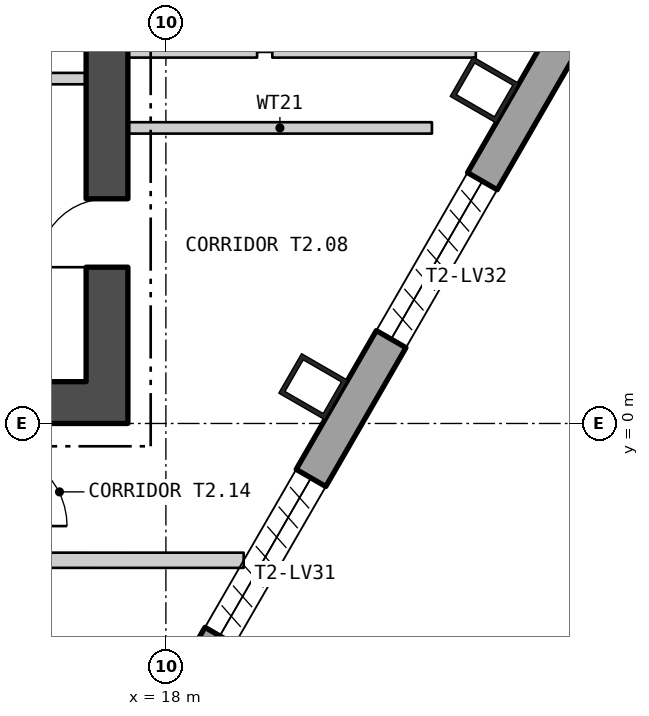
"""IFC4 building model, lengths in metres.
Left out: names, types, materials, properties, quantities, classifications, styles, units other than length and angle.
Written with IfcOpenShell. Run it as: python <this file> out.ifc"""

import sys

from ifc_helpers import new_model, si_unit, direction, frame, frame_2d, origin, origin_2d, place, context, subcontext, project, spatial, polyline, rectangle, hollow_rectangle, outline, extrude, element, fill, save


model = new_model("IFC4")
c1 = context("Model", 3, precision=1e-05, world=origin(), true_north=direction((0.0, 1.0)))
c2 = subcontext(c1, "Body", "Model", "MODEL_VIEW")
j1 = project(units=[si_unit("LENGTHUNIT", "METRE"), si_unit("PLANEANGLEUNIT", "RADIAN")], contexts=[c1])
p1 = place(None, origin())
s1 = spatial("IfcSite", under=j1, at=p1, CompositionType="ELEMENT")
p2 = place(p1, origin())
s2 = spatial("IfcBuilding", under=s1, at=p2, CompositionType="ELEMENT")
p3 = place(p2, frame((0.0, 0.0, 133.8)))
s3 = spatial("IfcBuildingStorey", under=s2, at=p3, CompositionType="ELEMENT", Elevation=133.8)
for number, where, z_axis, x_axis in (
    (1, (19.938, 0.484, 0.0), (0.0, 0.0, 1.0), (0.5, 0.866, 0.0)),
    (2, (22.193, 4.389, 0.0), (0.0, 0.0, 1.0), (0.5, 0.866, 0.0)),
):
    element("IfcColumn", number, at=place(p3, frame(where, z_axis=z_axis, x_axis=x_axis)), inside=s3, PredefinedType="COLUMN", context=c2, shape_type="SweptSolid", body=[
        extrude(hollow_rectangle(XDim=0.6, YDim=0.7, WallThickness=0.06, at=origin_2d()), origin(), (0.0, 0.0, 1.0), 6.0),
    ])
p4 = place(p3, frame((4.49, -27.423, -0.18), z_axis=(0.0, 0.0, 1.0), x_axis=(0.500000335318, 0.866025210188, 0.0)))
e3 = element("IfcWall", 3, at=p4, inside=s3, PredefinedType="SOLIDWALL", context=c2, shape_type="SweptSolid", body=[
    extrude(outline(polyline([(-0.13, -0.225), (45.88, -0.225), (45.62, 0.225), (0.13, 0.225), (-0.13, -0.225)])), origin(), (0.0, 0.0, 1.0), 6.0),
])
p5 = place(p4, frame((1.425, 0.0, 1.38)))
e4 = element("IfcOpeningElement", 4, at=p5, cuts=e3, PredefinedType="OPENING", context=c2, shape_type="SweptSolid", body=[
    extrude(rectangle(XDim=2.4, YDim=3.6, at=frame_2d((1.2, 1.8))), frame((0.0, 0.235, 0.0), z_axis=(0.0, -1.0, 0.0), x_axis=(1.0, 0.0, 0.0)), (0.0, 0.0, 1.0), 0.47),
])
p6 = place(p4, frame((5.895, 0.0, 1.38)))
e5 = element("IfcOpeningElement", 5, at=p6, cuts=e3, PredefinedType="OPENING", context=c2, shape_type="SweptSolid", body=[
    extrude(rectangle(XDim=2.4, YDim=3.6, at=frame_2d((1.2, 1.8))), frame((0.0, 0.235, 0.0), z_axis=(0.0, -1.0, 0.0), x_axis=(1.0, 0.0, 0.0)), (0.0, 0.0, 1.0), 0.47),
])
p7 = place(p4, frame((10.403, 0.0, 1.38)))
e6 = element("IfcOpeningElement", 6, at=p7, cuts=e3, PredefinedType="OPENING", context=c2, shape_type="SweptSolid", body=[
    extrude(rectangle(XDim=2.4, YDim=3.6, at=frame_2d((1.2, 1.8))), frame((0.0, 0.235, 0.0), z_axis=(0.0, -1.0, 0.0), x_axis=(1.0, 0.0, 0.0)), (0.0, 0.0, 1.0), 0.47),
])
p8 = place(p4, frame((14.912, 0.0, 1.38)))
e7 = element("IfcOpeningElement", 7, at=p8, cuts=e3, PredefinedType="OPENING", context=c2, shape_type="SweptSolid", body=[
    extrude(rectangle(XDim=2.4, YDim=3.6, at=frame_2d((1.2, 1.8))), frame((0.0, 0.235, 0.0), z_axis=(0.0, -1.0, 0.0), x_axis=(1.0, 0.0, 0.0)), (0.0, 0.0, 1.0), 0.47),
])
p9 = place(p4, frame((19.421, 0.0, 1.38)))
e8 = element("IfcOpeningElement", 8, at=p9, cuts=e3, PredefinedType="OPENING", context=c2, shape_type="SweptSolid", body=[
    extrude(rectangle(XDim=2.4, YDim=3.6, at=frame_2d((1.2, 1.8))), frame((0.0, 0.235, 0.0), z_axis=(0.0, -1.0, 0.0), x_axis=(1.0, 0.0, 0.0)), (0.0, 0.0, 1.0), 0.47),
])
p10 = place(p4, frame((23.929, 0.0, 1.38)))
e9 = element("IfcOpeningElement", 9, at=p10, cuts=e3, PredefinedType="OPENING", context=c2, shape_type="SweptSolid", body=[
    extrude(rectangle(XDim=2.4, YDim=3.6, at=frame_2d((1.2, 1.8))), frame((0.0, 0.235, 0.0), z_axis=(0.0, -1.0, 0.0), x_axis=(1.0, 0.0, 0.0)), (0.0, 0.0, 1.0), 0.47),
])
p11 = place(p4, frame((28.438, 0.0, 1.38)))
e10 = element("IfcOpeningElement", 10, at=p11, cuts=e3, PredefinedType="OPENING", context=c2, shape_type="SweptSolid", body=[
    extrude(rectangle(XDim=2.4, YDim=3.6, at=frame_2d((1.2, 1.8))), frame((0.0, 0.235, 0.0), z_axis=(0.0, -1.0, 0.0), x_axis=(1.0, 0.0, 0.0)), (0.0, 0.0, 1.0), 0.47),
])
p12 = place(p4, frame((32.947, 0.0, 1.38)))
e11 = element("IfcOpeningElement", 11, at=p12, cuts=e3, PredefinedType="OPENING", context=c2, shape_type="SweptSolid", body=[
    extrude(rectangle(XDim=2.4, YDim=3.6, at=frame_2d((1.2, 1.8))), frame((0.0, 0.235, 0.0), z_axis=(0.0, -1.0, 0.0), x_axis=(1.0, 0.0, 0.0)), (0.0, 0.0, 1.0), 0.47),
])
p13 = place(p4, frame((37.455, 0.0, 1.38)))
e12 = element("IfcOpeningElement", 12, at=p13, cuts=e3, PredefinedType="OPENING", context=c2, shape_type="SweptSolid", body=[
    extrude(rectangle(XDim=2.4, YDim=3.6, at=frame_2d((1.2, 1.8))), frame((0.0, 0.235, 0.0), z_axis=(0.0, -1.0, 0.0), x_axis=(1.0, 0.0, 0.0)), (0.0, 0.0, 1.0), 0.47),
])
p14 = place(p4, frame((41.925, 0.0, 1.38)))
e13 = element("IfcOpeningElement", 13, at=p14, cuts=e3, PredefinedType="OPENING", context=c2, shape_type="SweptSolid", body=[
    extrude(rectangle(XDim=2.4, YDim=3.6, at=frame_2d((1.2, 1.8))), frame((0.0, 0.235, 0.0), z_axis=(0.0, -1.0, 0.0), x_axis=(1.0, 0.0, 0.0)), (0.0, 0.0, 1.0), 0.47),
])
p15 = place(p3, frame((-17.5, 0.275, 0.0), z_axis=(0.0, 0.0, 1.0), x_axis=(1.0, 0.0, 0.0)))
e14 = element("IfcWall", 14, at=p15, inside=s3, PredefinedType="SHEAR", context=c2, shape_type="SweptSolid", body=[
    extrude(rectangle(XDim=35.0, YDim=0.55, at=frame_2d((17.5, 0.0))), origin(), (0.0, 0.0, 1.0), 5.8),
])
p16 = place(p15, frame((12.0, 0.0, 0.0)))
e15 = element("IfcOpeningElement", 15, at=p16, cuts=e14, PredefinedType="OPENING", context=c2, shape_type="SweptSolid", body=[
    extrude(rectangle(XDim=1.8, YDim=2.4, at=frame_2d((0.9, 1.2))), frame((0.0, 0.285, 0.0), z_axis=(0.0, -1.0, 0.0), x_axis=(1.0, 0.0, 0.0)), (0.0, 0.0, 1.0), 0.57),
])
p17 = place(p15, frame((22.0, 0.0, 0.0)))
e16 = element("IfcOpeningElement", 16, at=p17, cuts=e14, PredefinedType="OPENING", context=c2, shape_type="SweptSolid", body=[
    extrude(rectangle(XDim=1.8, YDim=2.4, at=frame_2d((0.9, 1.2))), frame((0.0, 0.285, 0.0), z_axis=(0.0, -1.0, 0.0), x_axis=(1.0, 0.0, 0.0)), (0.0, 0.0, 1.0), 0.57),
])
p18 = place(p3, frame((17.225, 0.55, 0.0), z_axis=(0.0, 0.0, 1.0), x_axis=(0.0, 1.0, 0.0)))
e17 = element("IfcWall", 17, at=p18, inside=s3, PredefinedType="SHEAR", context=c2, shape_type="SweptSolid", body=[
    extrude(rectangle(XDim=16.9, YDim=0.55, at=frame_2d((8.45, 0.0))), origin(), (0.0, 0.0, 1.0), 5.8),
])
p19 = place(p18, frame((5.75, 0.0, 0.0)))
e18 = element("IfcOpeningElement", 18, at=p19, cuts=e17, PredefinedType="OPENING", context=c2, shape_type="SweptSolid", body=[
    extrude(rectangle(XDim=1.5, YDim=2.1, at=frame_2d((0.75, 1.05))), frame((0.0, 0.285, 0.0), z_axis=(0.0, -1.0, 0.0), x_axis=(1.0, 0.0, 0.0)), (0.0, 0.0, 1.0), 0.57),
])
p20 = place(p18, frame((1.506, 0.0, 0.0)))
e19 = element("IfcOpeningElement", 19, at=p20, cuts=e17, PredefinedType="OPENING", context=c2, shape_type="SweptSolid", body=[
    extrude(rectangle(XDim=0.9, YDim=2.1, at=frame_2d((0.45, 1.05))), frame((0.0, 0.285, 0.0), z_axis=(0.0, -1.0, 0.0), x_axis=(1.0, 0.0, 0.0)), (0.0, 0.0, 1.0), 0.57),
])
p21 = place(p18, frame((4.489, 0.0, 0.0)))
e20 = element("IfcOpeningElement", 20, at=p21, cuts=e17, PredefinedType="OPENING", context=c2, shape_type="SweptSolid", body=[
    extrude(rectangle(XDim=0.9, YDim=2.1, at=frame_2d((0.45, 1.05))), frame((0.0, 0.285, 0.0), z_axis=(0.0, -1.0, 0.0), x_axis=(1.0, 0.0, 0.0)), (0.0, 0.0, 1.0), 0.57),
])
p22 = place(p18, frame((10.553, 0.0, 0.0)))
e21 = element("IfcOpeningElement", 21, at=p22, cuts=e17, PredefinedType="OPENING", context=c2, shape_type="SweptSolid", body=[
    extrude(rectangle(XDim=0.9, YDim=2.1, at=frame_2d((0.45, 1.05))), frame((0.0, 0.285, 0.0), z_axis=(0.0, -1.0, 0.0), x_axis=(1.0, 0.0, 0.0)), (0.0, 0.0, 1.0), 0.57),
])
p23 = place(p18, frame((15.328, 0.0, 0.0)))
e22 = element("IfcOpeningElement", 22, at=p23, cuts=e17, PredefinedType="OPENING", context=c2, shape_type="SweptSolid", body=[
    extrude(rectangle(XDim=1.0, YDim=2.1, at=frame_2d((0.5, 1.05))), frame((0.0, 0.285, 0.0), z_axis=(0.0, -1.0, 0.0), x_axis=(1.0, 0.0, 0.0)), (0.0, 0.0, 1.0), 0.57),
])
p24 = place(p3, frame((14.5, 4.538, 0.0), z_axis=(0.0, 0.0, 1.0), x_axis=(1.0, 0.0, 0.0)))
e23 = element("IfcWall", 23, at=p24, inside=s3, PredefinedType="PARTITIONING", context=c2, shape_type="SweptSolid", body=[
    extrude(rectangle(XDim=2.45, YDim=0.15, at=frame_2d((1.225, 0.0))), origin(), (0.0, 0.0, 1.0), 5.8),
])
p25 = place(p3, frame((7.235, -1.799, 0.0), z_axis=(0.0, 0.0, 1.0), x_axis=(0.999999996402, -8.4832032e-05, 0.0)))
e24 = element("IfcWall", 24, at=p25, inside=s3, PredefinedType="PARTITIONING", context=c2, shape_type="SweptSolid", body=[
    extrude(rectangle(XDim=11.788, YDim=0.2, at=frame_2d((5.894, 0.0))), origin(), (0.0, 0.0, 1.0), 5.8),
])
p26 = place(p25, frame((2.726, 0.0, 0.0)))
e25 = element("IfcOpeningElement", 25, at=p26, cuts=e24, PredefinedType="OPENING", context=c2, shape_type="SweptSolid", body=[
    extrude(rectangle(XDim=1.1, YDim=2.1, at=frame_2d((0.55, 1.05))), frame((0.0, 0.11, 0.0), z_axis=(0.0, -1.0, 0.0), x_axis=(1.0, 0.0, 0.0)), (0.0, 0.0, 1.0), 0.22),
])
p27 = place(p3, frame((17.5, 3.889, 0.0), z_axis=(0.0, 0.0, 1.0), x_axis=(1.0, 0.0, 0.0)))
e26 = element("IfcWall", 26, at=p27, inside=s3, PredefinedType="PARTITIONING", context=c2, shape_type="SweptSolid", body=[
    extrude(rectangle(XDim=4.0, YDim=0.15, at=frame_2d((2.0, 0.0))), origin(), (0.0, 0.0, 1.0), 5.8),
])
p28 = place(p3, frame((17.5, 4.889, 0.0), z_axis=(0.0, 0.0, 1.0), x_axis=(1.0, 0.0, 0.0)))
e27 = element("IfcWall", 27, at=p28, inside=s3, PredefinedType="PARTITIONING", context=c2, shape_type="SweptSolid", body=[
    extrude(rectangle(XDim=1.7, YDim=0.15, at=frame_2d((0.85, 0.0))), origin(), (0.0, 0.0, 1.0), 5.8),
])
p29 = place(p3, frame((19.4, 4.889, 0.0), z_axis=(0.0, 0.0, 1.0), x_axis=(1.0, 0.0, 0.0)))
e28 = element("IfcWall", 28, at=p29, inside=s3, PredefinedType="PARTITIONING", context=c2, shape_type="SweptSolid", body=[
    extrude(rectangle(XDim=2.677, YDim=0.15, at=frame_2d((1.339, 0.0))), origin(), (0.0, 0.0, 1.0), 5.8),
])
p30 = place(p20, origin())
e29 = element("IfcDoor", 29, at=p30, inside=s3, OperationType="SINGLE_SWING_RIGHT", PredefinedType="DOOR", context=c2, shape_type="SweptSolid", body=[
    extrude(rectangle(XDim=0.9, YDim=2.1, at=frame_2d((0.45, 1.05))), frame((0.0, 0.025, 0.0), z_axis=(0.0, -1.0, 0.0), x_axis=(1.0, 0.0, 0.0)), (0.0, 0.0, 1.0), 0.05),
])
fill(e19, e29)
save(model, sys.argv[1])
